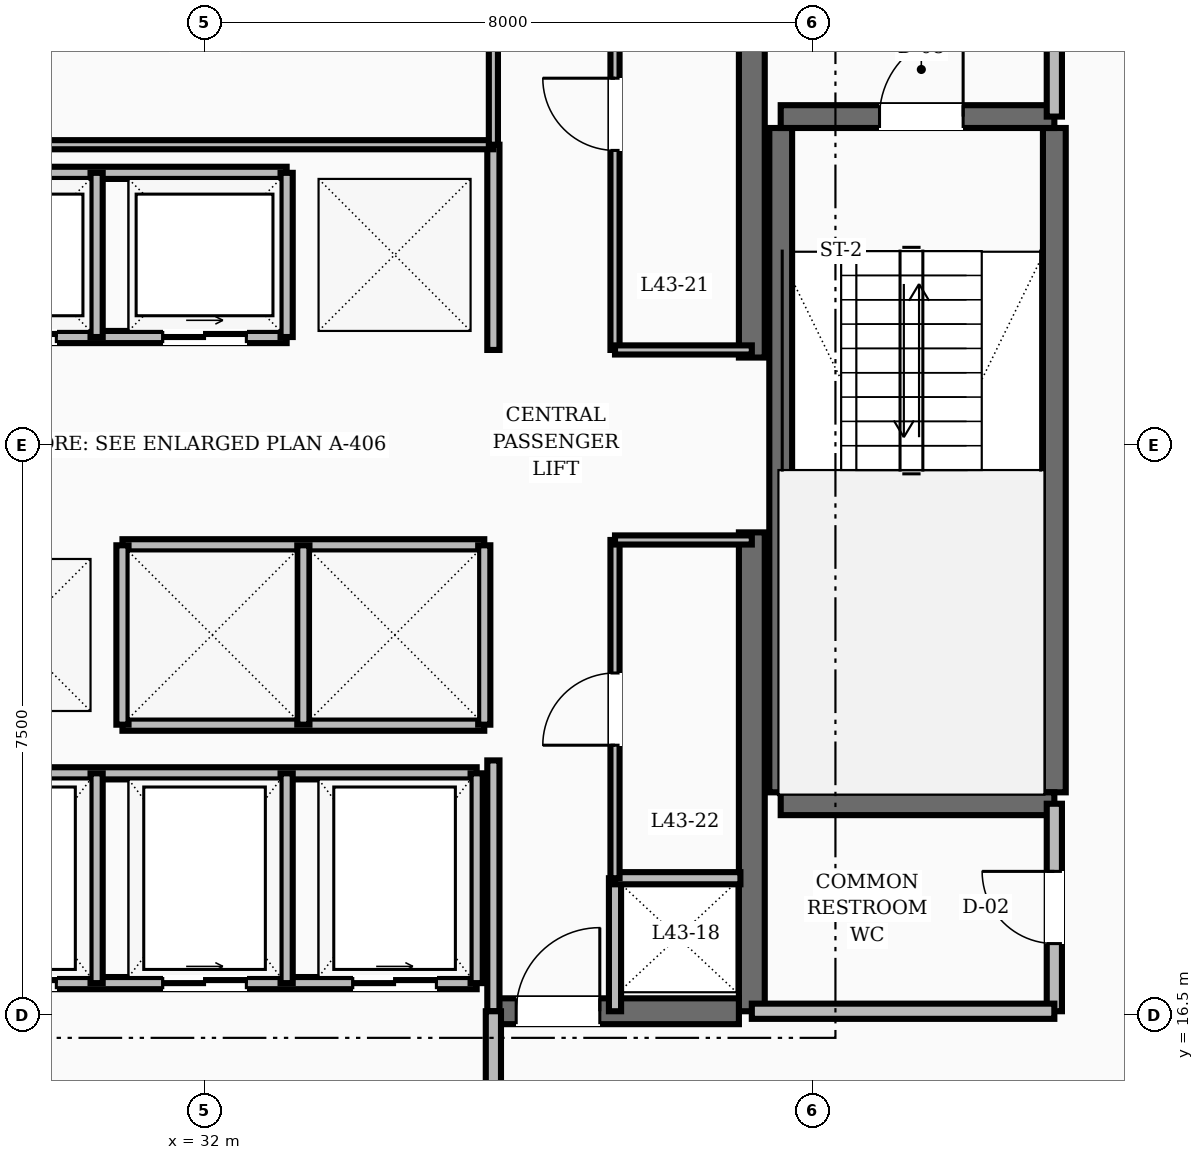
"""IFC4 building model, lengths in metres.
Left out: names, types, materials, properties, quantities, classifications, styles, units other than length and angle.
Written with IfcOpenShell. Run it as: python <this file> out.ifc"""

import sys

from ifc_helpers import new_model, si_unit, direction, frame, frame_2d, origin, place, context, subcontext, project, spatial, rectangle, extrude, element, fill, save


model = new_model("IFC4")
c1 = context("Model", 3, precision=1e-05, world=origin(), true_north=direction((0.0, 1.0)))
c2 = subcontext(c1, "Body", "Model", "MODEL_VIEW")
j1 = project(units=[si_unit("LENGTHUNIT", "METRE"), si_unit("PLANEANGLEUNIT", "RADIAN")], contexts=[c1])
p1 = place(None, origin())
s1 = spatial("IfcSite", under=j1, at=p1, CompositionType="ELEMENT")
p2 = place(p1, origin())
s2 = spatial("IfcBuilding", under=s1, at=p2, CompositionType="ELEMENT")
p3 = place(p2, frame((0.0, 0.0, 167.6)))
s3 = spatial("IfcBuildingStorey", under=s2, at=p3, CompositionType="ELEMENT", Elevation=167.6)
for number, where, z_axis, x_axis in (
    (1, (39.2, 16.55, 0.0), (0.0, 0.0, 1.0), (0.0, 1.0, 0.0)),
    (2, (39.2, 25.15, 0.0), (0.0, 0.0, 1.0), (0.0, 1.0, 0.0)),
):
    element("IfcWall", number, at=place(p3, frame(where, z_axis=z_axis, x_axis=x_axis)), inside=s3, PredefinedType="SHEAR", context=c2, shape_type="SweptSolid", body=[
        extrude(rectangle(XDim=6.3, YDim=0.34, at=frame_2d((3.15, 0.0))), origin(), (0.0, 0.0, 1.0), 3.6),
    ])
p4 = place(p3, frame((35.8, 16.55, 0.0), z_axis=(0.0, 0.0, 1.0), x_axis=(1.0, 0.0, 0.0)))
e3 = element("IfcWall", 3, at=p4, inside=s3, PredefinedType="SHEAR", context=c2, shape_type="SweptSolid", body=[
    extrude(rectangle(XDim=3.23, YDim=0.34, at=frame_2d((1.615, 0.0))), origin(), (0.0, 0.0, 1.0), 3.6),
])
p5 = place(p4, frame((0.3, 0.0, 0.0)))
e4 = element("IfcOpeningElement", 4, at=p5, cuts=e3, PredefinedType="OPENING", context=c2, shape_type="SweptSolid", body=[
    extrude(rectangle(XDim=1.1, YDim=2.1, at=frame_2d((0.55, 1.05))), frame((0.0, 0.18, 0.0), z_axis=(0.0, -1.0, 0.0), x_axis=(1.0, 0.0, 0.0)), (0.0, 0.0, 1.0), 0.36),
])
for number, where, z_axis, x_axis in (
    (5, (43.18, 19.43, 0.0), (0.0, 0.0, 1.0), (0.0, 1.0, 0.0)),
    (6, (39.58, 19.43, 0.0), (0.0, 0.0, 1.0), (0.0, 1.0, 0.0)),
):
    element("IfcWall", number, at=place(p3, frame(where, z_axis=z_axis, x_axis=x_axis)), inside=s3, PredefinedType="SHEAR", context=c2, shape_type="SweptSolid", body=[
        extrude(rectangle(XDim=8.74, YDim=0.3, at=frame_2d((4.37, 0.0))), origin(), (0.0, 0.0, 1.0), 3.6),
    ])
p6 = place(p3, frame((39.58, 19.28, 0.0), z_axis=(0.0, 0.0, 1.0), x_axis=(1.0, 0.0, 0.0)))
e7 = element("IfcWall", 7, at=p6, inside=s3, PredefinedType="SHEAR", context=c2, shape_type="SweptSolid", body=[
    extrude(rectangle(XDim=3.6, YDim=0.3, at=frame_2d((1.8, 0.0))), origin(), (0.0, 0.0, 1.0), 3.6),
])
p7 = place(p3, frame((39.58, 28.32, 0.0), z_axis=(0.0, 0.0, 1.0), x_axis=(1.0, 0.0, 0.0)))
e8 = element("IfcWall", 8, at=p7, inside=s3, PredefinedType="SHEAR", context=c2, shape_type="SweptSolid", body=[
    extrude(rectangle(XDim=3.6, YDim=0.3, at=frame_2d((1.8, 0.0))), origin(), (0.0, 0.0, 1.0), 3.6),
])
p8 = place(p7, frame((1.3, 0.0, 0.0)))
e9 = element("IfcOpeningElement", 9, at=p8, cuts=e8, PredefinedType="OPENING", context=c2, shape_type="SweptSolid", body=[
    extrude(rectangle(XDim=1.1, YDim=2.1, at=frame_2d((0.55, 1.05))), frame((0.0, 0.16, 0.0), z_axis=(0.0, -1.0, 0.0), x_axis=(1.0, 0.0, 0.0)), (0.0, 0.0, 1.0), 0.32),
])
p9 = place(p3, frame((43.18, 28.32, 0.0), z_axis=(0.0, 0.0, 1.0), x_axis=(0.0, 1.0, 0.0)))
e10 = element("IfcWall", 10, at=p9, inside=s3, PredefinedType="SOLIDWALL", context=c2, shape_type="SweptSolid", body=[
    extrude(rectangle(XDim=3.13, YDim=0.2, at=frame_2d((1.565, 0.0))), origin(), (0.0, 0.0, 1.0), 2.8),
])
p10 = place(p9, frame((1.015, 0.0, 0.0)))
e11 = element("IfcOpeningElement", 11, at=p10, cuts=e10, PredefinedType="OPENING", context=c2, shape_type="SweptSolid", body=[
    extrude(rectangle(XDim=1.1, YDim=2.1, at=frame_2d((0.55, 1.05))), frame((0.0, 0.11, 0.0), z_axis=(0.0, -1.0, 0.0), x_axis=(1.0, 0.0, 0.0)), (0.0, 0.0, 1.0), 0.22),
])
p11 = place(p3, frame((43.18, 16.55, 0.0), z_axis=(0.0, 0.0, 1.0), x_axis=(0.0, 1.0, 0.0)))
e12 = element("IfcWall", 12, at=p11, inside=s3, PredefinedType="SOLIDWALL", context=c2, shape_type="SweptSolid", body=[
    extrude(rectangle(XDim=2.73, YDim=0.2, at=frame_2d((1.365, 0.0))), origin(), (0.0, 0.0, 1.0), 2.8),
])
p12 = place(p11, frame((0.89, 0.0, 0.0)))
e13 = element("IfcOpeningElement", 13, at=p12, cuts=e12, PredefinedType="OPENING", context=c2, shape_type="SweptSolid", body=[
    extrude(rectangle(XDim=0.95, YDim=2.1, at=frame_2d((0.475, 1.05))), frame((0.0, 0.11, 0.0), z_axis=(0.0, -1.0, 0.0), x_axis=(1.0, 0.0, 0.0)), (0.0, 0.0, 1.0), 0.22),
])
p13 = place(p3, frame((39.2, 16.55, 0.0), z_axis=(0.0, 0.0, 1.0), x_axis=(1.0, 0.0, 0.0)))
e14 = element("IfcWall", 14, at=p13, inside=s3, PredefinedType="SOLIDWALL", context=c2, shape_type="SweptSolid", body=[
    extrude(rectangle(XDim=3.98, YDim=0.2, at=frame_2d((1.99, 0.0))), origin(), (0.0, 0.0, 1.0), 2.8),
])
p14 = place(p3, frame((35.8, 16.55, 0.0), z_axis=(0.0, 0.0, 1.0), x_axis=(0.0, 1.0, 0.0)))
e15 = element("IfcWall", 15, at=p14, inside=s3, PredefinedType="SOLIDWALL", context=c2, shape_type="SweptSolid", body=[
    extrude(rectangle(XDim=3.3, YDim=0.16, at=frame_2d((1.65, 0.0))), origin(), (0.0, 0.0, 1.0), 2.8),
])
p15 = place(p3, frame((37.4, 16.55, 0.0), z_axis=(0.0, 0.0, 1.0), x_axis=(0.0, 1.0, 0.0)))
e16 = element("IfcWall", 16, at=p15, inside=s3, PredefinedType="SOLIDWALL", context=c2, shape_type="SweptSolid", body=[
    extrude(rectangle(XDim=1.75, YDim=0.16, at=frame_2d((0.875, 0.0))), origin(), (0.0, 0.0, 1.0), 2.8),
])
p16 = place(p3, frame((35.8, 25.25, 0.0), z_axis=(0.0, 0.0, 1.0), x_axis=(0.0, 1.0, 0.0)))
e17 = element("IfcWall", 17, at=p16, inside=s3, PredefinedType="SOLIDWALL", context=c2, shape_type="SweptSolid", body=[
    extrude(rectangle(XDim=2.7, YDim=0.16, at=frame_2d((1.35, 0.0))), origin(), (0.0, 0.0, 1.0), 2.8),
])
p17 = place(p3, frame((35.8, 14.35, 0.0), z_axis=(0.0, 0.0, 1.0), x_axis=(0.0, 1.0, 0.0)))
e18 = element("IfcWall", 18, at=p17, inside=s3, PredefinedType="SOLIDWALL", context=c2, shape_type="SweptSolid", body=[
    extrude(rectangle(XDim=2.2, YDim=0.2, at=frame_2d((1.1, 0.0))), origin(), (0.0, 0.0, 1.0), 2.8),
])
p18 = place(p3, frame((28.42, 25.42, 0.0), z_axis=(0.0, 0.0, 1.0), x_axis=(1.0, 0.0, 0.0)))
e19 = element("IfcWall", 19, at=p18, inside=s3, PredefinedType="SOLIDWALL", context=c2, shape_type="SweptSolid", body=[
    extrude(rectangle(XDim=4.66, YDim=0.16, at=frame_2d((2.33, 0.0))), origin(), (0.0, 0.0, 1.0), 2.8),
])
p19 = place(p18, frame((0.53, 0.0, 0.0)))
e20 = element("IfcOpeningElement", 20, at=p19, cuts=e19, PredefinedType="OPENING", context=c2, shape_type="SweptSolid", body=[
    extrude(rectangle(XDim=1.1, YDim=2.15, at=frame_2d((0.55, 1.075))), frame((0.0, 0.09, 0.0), z_axis=(0.0, -1.0, 0.0), x_axis=(1.0, 0.0, 0.0)), (0.0, 0.0, 1.0), 0.18),
])
p20 = place(p18, frame((3.03, 0.0, 0.0)))
e21 = element("IfcOpeningElement", 21, at=p20, cuts=e19, PredefinedType="OPENING", context=c2, shape_type="SweptSolid", body=[
    extrude(rectangle(XDim=1.1, YDim=2.15, at=frame_2d((0.55, 1.075))), frame((0.0, 0.09, 0.0), z_axis=(0.0, -1.0, 0.0), x_axis=(1.0, 0.0, 0.0)), (0.0, 0.0, 1.0), 0.18),
])
p21 = place(p3, frame((28.42, 27.58, 0.0), z_axis=(0.0, 0.0, 1.0), x_axis=(1.0, 0.0, 0.0)))
e22 = element("IfcWall", 22, at=p21, inside=s3, PredefinedType="SOLIDWALL", context=c2, shape_type="SweptSolid", body=[
    extrude(rectangle(XDim=4.66, YDim=0.16, at=frame_2d((2.33, 0.0))), origin(), (0.0, 0.0, 1.0), 2.8),
])
for number, where, z_axis, x_axis in (
    (23, (30.58, 25.42, 0.0), (0.0, 0.0, 1.0), (0.0, 1.0, 0.0)),
    (24, (33.08, 25.42, 0.0), (0.0, 0.0, 1.0), (0.0, 1.0, 0.0)),
):
    element("IfcWall", number, at=place(p3, frame(where, z_axis=z_axis, x_axis=x_axis)), inside=s3, PredefinedType="SOLIDWALL", context=c2, shape_type="SweptSolid", body=[
        extrude(rectangle(XDim=2.16, YDim=0.16, at=frame_2d((1.08, 0.0))), origin(), (0.0, 0.0, 1.0), 2.8),
    ])
for number, where, z_axis, x_axis in (
    (25, (30.92, 22.68, 0.0), (0.0, 0.0, 1.0), (1.0, 0.0, 0.0)),
    (26, (30.92, 20.32, 0.0), (0.0, 0.0, 1.0), (1.0, 0.0, 0.0)),
):
    element("IfcWall", number, at=place(p3, frame(where, z_axis=z_axis, x_axis=x_axis)), inside=s3, PredefinedType="SOLIDWALL", context=c2, shape_type="SweptSolid", body=[
        extrude(rectangle(XDim=4.76, YDim=0.16, at=frame_2d((2.38, 0.0))), origin(), (0.0, 0.0, 1.0), 2.8),
    ])
for number, where, z_axis, x_axis in (
    (27, (30.92, 20.32, 0.0), (0.0, 0.0, 1.0), (0.0, 1.0, 0.0)),
    (28, (33.3, 20.32, 0.0), (0.0, 0.0, 1.0), (0.0, 1.0, 0.0)),
    (29, (35.68, 20.32, 0.0), (0.0, 0.0, 1.0), (0.0, 1.0, 0.0)),
):
    element("IfcWall", number, at=place(p3, frame(where, z_axis=z_axis, x_axis=x_axis)), inside=s3, PredefinedType="SOLIDWALL", context=c2, shape_type="SweptSolid", body=[
        extrude(rectangle(XDim=2.36, YDim=0.16, at=frame_2d((1.18, 0.0))), origin(), (0.0, 0.0, 1.0), 2.8),
    ])
p22 = place(p3, frame((28.42, 16.92, 0.0), z_axis=(0.0, 0.0, 1.0), x_axis=(1.0, 0.0, 0.0)))
e30 = element("IfcWall", 30, at=p22, inside=s3, PredefinedType="SOLIDWALL", context=c2, shape_type="SweptSolid", body=[
    extrude(rectangle(XDim=7.16, YDim=0.16, at=frame_2d((3.58, 0.0))), origin(), (0.0, 0.0, 1.0), 2.8),
])
p23 = place(p22, frame((0.53, 0.0, 0.0)))
e31 = element("IfcOpeningElement", 31, at=p23, cuts=e30, PredefinedType="OPENING", context=c2, shape_type="SweptSolid", body=[
    extrude(rectangle(XDim=1.1, YDim=2.15, at=frame_2d((0.55, 1.075))), frame((0.0, 0.09, 0.0), z_axis=(0.0, -1.0, 0.0), x_axis=(1.0, 0.0, 0.0)), (0.0, 0.0, 1.0), 0.18),
])
p24 = place(p22, frame((3.03, 0.0, 0.0)))
e32 = element("IfcOpeningElement", 32, at=p24, cuts=e30, PredefinedType="OPENING", context=c2, shape_type="SweptSolid", body=[
    extrude(rectangle(XDim=1.1, YDim=2.15, at=frame_2d((0.55, 1.075))), frame((0.0, 0.09, 0.0), z_axis=(0.0, -1.0, 0.0), x_axis=(1.0, 0.0, 0.0)), (0.0, 0.0, 1.0), 0.18),
])
p25 = place(p22, frame((5.53, 0.0, 0.0)))
e33 = element("IfcOpeningElement", 33, at=p25, cuts=e30, PredefinedType="OPENING", context=c2, shape_type="SweptSolid", body=[
    extrude(rectangle(XDim=1.1, YDim=2.15, at=frame_2d((0.55, 1.075))), frame((0.0, 0.09, 0.0), z_axis=(0.0, -1.0, 0.0), x_axis=(1.0, 0.0, 0.0)), (0.0, 0.0, 1.0), 0.18),
])
p26 = place(p3, frame((28.42, 19.68, 0.0), z_axis=(0.0, 0.0, 1.0), x_axis=(1.0, 0.0, 0.0)))
e34 = element("IfcWall", 34, at=p26, inside=s3, PredefinedType="SOLIDWALL", context=c2, shape_type="SweptSolid", body=[
    extrude(rectangle(XDim=7.16, YDim=0.16, at=frame_2d((3.58, 0.0))), origin(), (0.0, 0.0, 1.0), 2.8),
])
for number, where, z_axis, x_axis in (
    (35, (30.58, 16.92, 0.0), (0.0, 0.0, 1.0), (0.0, 1.0, 0.0)),
    (36, (33.08, 16.92, 0.0), (0.0, 0.0, 1.0), (0.0, 1.0, 0.0)),
    (37, (35.58, 16.92, 0.0), (0.0, 0.0, 1.0), (0.0, 1.0, 0.0)),
):
    element("IfcWall", number, at=place(p3, frame(where, z_axis=z_axis, x_axis=x_axis)), inside=s3, PredefinedType="SOLIDWALL", context=c2, shape_type="SweptSolid", body=[
        extrude(rectangle(XDim=2.76, YDim=0.16, at=frame_2d((1.38, 0.0))), origin(), (0.0, 0.0, 1.0), 2.8),
    ])
p27 = place(p3, frame((28.2, 27.95, 0.0), z_axis=(0.0, 0.0, 1.0), x_axis=(1.0, 0.0, 0.0)))
e38 = element("IfcWall", 38, at=p27, inside=s3, PredefinedType="PARTITIONING", context=c2, shape_type="SweptSolid", body=[
    extrude(rectangle(XDim=7.6, YDim=0.12, at=frame_2d((3.8, 0.0))), origin(), (0.0, 0.0, 1.0), 2.8),
])
p28 = place(p3, frame((35.8, 27.95, 0.0), z_axis=(0.0, 0.0, 1.0), x_axis=(0.0, 1.0, 0.0)))
e39 = element("IfcWall", 39, at=p28, inside=s3, PredefinedType="PARTITIONING", context=c2, shape_type="SweptSolid", body=[
    extrude(rectangle(XDim=3.5, YDim=0.12, at=frame_2d((1.75, 0.0))), origin(), (0.0, 0.0, 1.0), 2.8),
])
p29 = place(p28, frame((1.275, 0.0, 0.0)))
e40 = element("IfcOpeningElement", 40, at=p29, cuts=e39, PredefinedType="OPENING", context=c2, shape_type="SweptSolid", body=[
    extrude(rectangle(XDim=0.95, YDim=2.1, at=frame_2d((0.475, 1.05))), frame((0.0, 0.07, 0.0), z_axis=(0.0, -1.0, 0.0), x_axis=(1.0, 0.0, 0.0)), (0.0, 0.0, 1.0), 0.14),
])
p30 = place(p3, frame((37.4, 18.3, 0.0), z_axis=(0.0, 0.0, 1.0), x_axis=(1.0, 0.0, 0.0)))
e41 = element("IfcWall", 41, at=p30, inside=s3, PredefinedType="SOLIDWALL", context=c2, shape_type="SweptSolid", body=[
    extrude(rectangle(XDim=1.65, YDim=0.16, at=frame_2d((0.825, 0.0))), origin(), (0.0, 0.0, 1.0), 2.8),
])
p31 = place(p3, frame((37.4, 25.25, 0.0), z_axis=(0.0, 0.0, 1.0), x_axis=(0.0, 1.0, 0.0)))
e42 = element("IfcWall", 42, at=p31, inside=s3, PredefinedType="PARTITIONING", context=c2, shape_type="SweptSolid", body=[
    extrude(rectangle(XDim=6.2, YDim=0.12, at=frame_2d((3.1, 0.0))), origin(), (0.0, 0.0, 1.0), 2.8),
])
p32 = place(p31, frame((2.625, 0.0, 0.0)))
e43 = element("IfcOpeningElement", 43, at=p32, cuts=e42, PredefinedType="OPENING", context=c2, shape_type="SweptSolid", body=[
    extrude(rectangle(XDim=0.95, YDim=2.1, at=frame_2d((0.475, 1.05))), frame((0.0, 0.07, 0.0), z_axis=(0.0, -1.0, 0.0), x_axis=(1.0, 0.0, 0.0)), (0.0, 0.0, 1.0), 0.14),
])
p33 = place(p3, frame((37.4, 25.25, 0.0), z_axis=(0.0, 0.0, 1.0), x_axis=(1.0, 0.0, 0.0)))
e44 = element("IfcWall", 44, at=p33, inside=s3, PredefinedType="PARTITIONING", context=c2, shape_type="SweptSolid", body=[
    extrude(rectangle(XDim=1.8, YDim=0.12, at=frame_2d((0.9, 0.0))), origin(), (0.0, 0.0, 1.0), 2.8),
])
p34 = place(p3, frame((37.4, 18.3, 0.0), z_axis=(0.0, 0.0, 1.0), x_axis=(0.0, 1.0, 0.0)))
e45 = element("IfcWall", 45, at=p34, inside=s3, PredefinedType="PARTITIONING", context=c2, shape_type="SweptSolid", body=[
    extrude(rectangle(XDim=4.45, YDim=0.12, at=frame_2d((2.225, 0.0))), origin(), (0.0, 0.0, 1.0), 2.8),
])
p35 = place(p34, frame((1.75, 0.0, 0.0)))
e46 = element("IfcOpeningElement", 46, at=p35, cuts=e45, PredefinedType="OPENING", context=c2, shape_type="SweptSolid", body=[
    extrude(rectangle(XDim=0.95, YDim=2.1, at=frame_2d((0.475, 1.05))), frame((0.0, 0.07, 0.0), z_axis=(0.0, -1.0, 0.0), x_axis=(1.0, 0.0, 0.0)), (0.0, 0.0, 1.0), 0.14),
])
p36 = place(p3, frame((37.4, 22.75, 0.0), z_axis=(0.0, 0.0, 1.0), x_axis=(1.0, 0.0, 0.0)))
e47 = element("IfcWall", 47, at=p36, inside=s3, PredefinedType="PARTITIONING", context=c2, shape_type="SweptSolid", body=[
    extrude(rectangle(XDim=1.8, YDim=0.12, at=frame_2d((0.9, 0.0))), origin(), (0.0, 0.0, 1.0), 2.8),
])
p37 = place(p8, origin())
e48 = element("IfcDoor", 48, at=p37, inside=s3, OperationType="SINGLE_SWING_RIGHT", PredefinedType="DOOR", context=c2, shape_type="SweptSolid", body=[
    extrude(rectangle(XDim=1.1, YDim=2.1, at=frame_2d((0.55, 1.05))), frame((0.0, 0.025, 0.0), z_axis=(0.0, -1.0, 0.0), x_axis=(1.0, 0.0, 0.0)), (0.0, 0.0, 1.0), 0.05),
])
fill(e9, e48)
p38 = place(p12, origin())
e49 = element("IfcDoor", 49, at=p38, inside=s3, OperationType="SINGLE_SWING_RIGHT", PredefinedType="DOOR", context=c2, shape_type="SweptSolid", body=[
    extrude(rectangle(XDim=0.95, YDim=2.1, at=frame_2d((0.475, 1.05))), frame((0.0, 0.025, 0.0), z_axis=(0.0, -1.0, 0.0), x_axis=(1.0, 0.0, 0.0)), (0.0, 0.0, 1.0), 0.05),
])
fill(e13, e49)
p39 = place(p5, origin())
e50 = element("IfcDoor", 50, at=p39, inside=s3, OperationType="SINGLE_SWING_RIGHT", PredefinedType="DOOR", context=c2, shape_type="SweptSolid", body=[
    extrude(rectangle(XDim=1.1, YDim=2.1, at=frame_2d((0.55, 1.05))), frame((0.0, 0.025, 0.0), z_axis=(0.0, -1.0, 0.0), x_axis=(1.0, 0.0, 0.0)), (0.0, 0.0, 1.0), 0.05),
])
fill(e4, e50)
p40 = place(p19, origin())
e51 = element("IfcDoor", 51, at=p40, inside=s3, OperationType="SLIDING_TO_RIGHT", PredefinedType="DOOR", context=c2, shape_type="SweptSolid", body=[
    extrude(rectangle(XDim=1.1, YDim=2.15, at=frame_2d((0.55, 1.075))), frame((0.0, 0.025, 0.0), z_axis=(0.0, -1.0, 0.0), x_axis=(1.0, 0.0, 0.0)), (0.0, 0.0, 1.0), 0.05),
])
fill(e20, e51)
p41 = place(p20, origin())
e52 = element("IfcDoor", 52, at=p41, inside=s3, OperationType="SLIDING_TO_RIGHT", PredefinedType="DOOR", context=c2, shape_type="SweptSolid", body=[
    extrude(rectangle(XDim=1.1, YDim=2.15, at=frame_2d((0.55, 1.075))), frame((0.0, 0.025, 0.0), z_axis=(0.0, -1.0, 0.0), x_axis=(1.0, 0.0, 0.0)), (0.0, 0.0, 1.0), 0.05),
])
fill(e21, e52)
p42 = place(p23, origin())
e53 = element("IfcDoor", 53, at=p42, inside=s3, OperationType="SLIDING_TO_RIGHT", PredefinedType="DOOR", context=c2, shape_type="SweptSolid", body=[
    extrude(rectangle(XDim=1.1, YDim=2.15, at=frame_2d((0.55, 1.075))), frame((0.0, 0.025, 0.0), z_axis=(0.0, -1.0, 0.0), x_axis=(1.0, 0.0, 0.0)), (0.0, 0.0, 1.0), 0.05),
])
fill(e31, e53)
p43 = place(p24, origin())
e54 = element("IfcDoor", 54, at=p43, inside=s3, OperationType="SLIDING_TO_RIGHT", PredefinedType="DOOR", context=c2, shape_type="SweptSolid", body=[
    extrude(rectangle(XDim=1.1, YDim=2.15, at=frame_2d((0.55, 1.075))), frame((0.0, 0.025, 0.0), z_axis=(0.0, -1.0, 0.0), x_axis=(1.0, 0.0, 0.0)), (0.0, 0.0, 1.0), 0.05),
])
fill(e32, e54)
p44 = place(p25, origin())
e55 = element("IfcDoor", 55, at=p44, inside=s3, OperationType="SLIDING_TO_RIGHT", PredefinedType="DOOR", context=c2, shape_type="SweptSolid", body=[
    extrude(rectangle(XDim=1.1, YDim=2.15, at=frame_2d((0.55, 1.075))), frame((0.0, 0.025, 0.0), z_axis=(0.0, -1.0, 0.0), x_axis=(1.0, 0.0, 0.0)), (0.0, 0.0, 1.0), 0.05),
])
fill(e33, e55)
p45 = place(p32, origin())
e56 = element("IfcDoor", 56, at=p45, inside=s3, OperationType="SINGLE_SWING_RIGHT", PredefinedType="DOOR", context=c2, shape_type="SweptSolid", body=[
    extrude(rectangle(XDim=0.95, YDim=2.1, at=frame_2d((0.475, 1.05))), frame((0.0, 0.025, 0.0), z_axis=(0.0, -1.0, 0.0), x_axis=(1.0, 0.0, 0.0)), (0.0, 0.0, 1.0), 0.05),
])
fill(e43, e56)
p46 = place(p35, origin())
e57 = element("IfcDoor", 57, at=p46, inside=s3, OperationType="SINGLE_SWING_LEFT", PredefinedType="DOOR", context=c2, shape_type="SweptSolid", body=[
    extrude(rectangle(XDim=0.95, YDim=2.1, at=frame_2d((0.475, 1.05))), frame((0.0, 0.025, 0.0), z_axis=(0.0, -1.0, 0.0), x_axis=(1.0, 0.0, 0.0)), (0.0, 0.0, 1.0), 0.05),
])
fill(e46, e57)
save(model, sys.argv[1])
